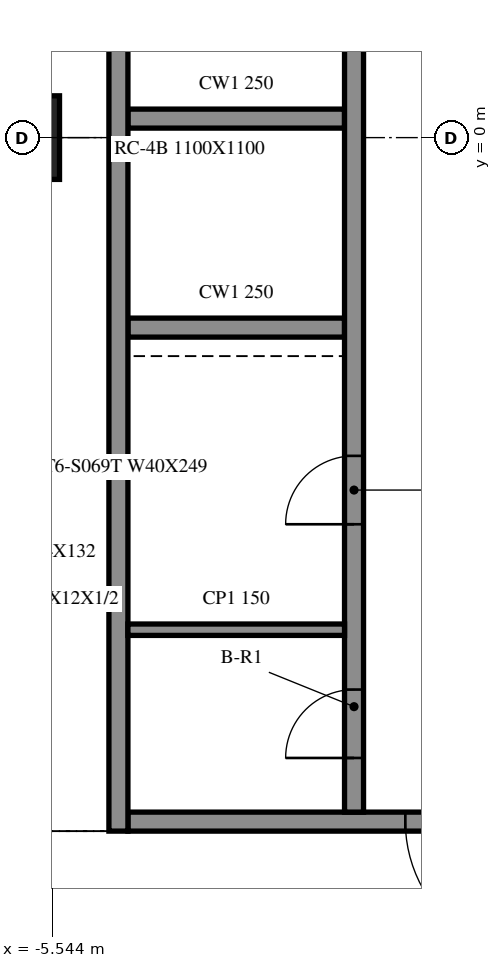
"""IFC4 building model, lengths in metres.
Left out: names, types, materials, properties, quantities, classifications, styles, units other than length and angle.
Written with IfcOpenShell. Run it as: python <this file> out.ifc"""

import sys

from ifc_helpers import new_model, si_unit, direction, frame, frame_2d, origin, origin_2d, place, context, subcontext, project, spatial, rectangle, extrude, element, fill, save


model = new_model("IFC4")
c1 = context("Model", 3, precision=1e-05, world=origin(), true_north=direction((0.0, 1.0)))
c2 = subcontext(c1, "Body", "Model", "MODEL_VIEW")
j1 = project(units=[si_unit("LENGTHUNIT", "METRE"), si_unit("PLANEANGLEUNIT", "RADIAN")], contexts=[c1])
p1 = place(None, origin())
s1 = spatial("IfcSite", under=j1, at=p1, CompositionType="ELEMENT")
p2 = place(p1, origin())
s2 = spatial("IfcBuilding", under=s1, at=p2, CompositionType="ELEMENT")
p3 = place(p2, frame((0.0, 0.0, 224.3)))
s3 = spatial("IfcBuildingStorey", under=s2, at=p3, CompositionType="ELEMENT", Elevation=224.3)
p4 = place(p3, frame((-6.0, 0.0, -0.4), z_axis=(0.0, 0.0, 1.0), x_axis=(1.0, 0.0, 0.0)))
e1 = element("IfcColumn", 1, at=p4, inside=s3, PredefinedType="COLUMN", context=c2, shape_type="SweptSolid", body=[
    extrude(rectangle(XDim=1.1, YDim=1.1, at=origin_2d()), origin(), (0.0, 0.0, 1.0), 4.36),
])
p5 = place(p3, frame((-4.675, 15.125, 0.0), z_axis=(0.0, 0.0, 1.0), x_axis=(0.0, -1.0, 0.0)))
e2 = element("IfcWall", 2, at=p5, inside=s3, PredefinedType="SOLIDWALL", context=c2, shape_type="SweptSolid", body=[
    extrude(rectangle(XDim=24.25, YDim=0.25, at=frame_2d((12.125, 0.0))), origin(), (0.0, 0.0, 1.0), 3.96),
])
p6 = place(p3, frame((4.55, -9.0, 0.0), z_axis=(0.0, 0.0, 1.0), x_axis=(-1.0, 0.0, 0.0)))
e3 = element("IfcWall", 3, at=p6, inside=s3, PredefinedType="SOLIDWALL", context=c2, shape_type="SweptSolid", body=[
    extrude(rectangle(XDim=9.1, YDim=0.25, at=frame_2d((4.55, 0.0))), origin(), (0.0, 0.0, 1.0), 3.96),
])
p7 = place(p6, frame((3.65, 0.0, 0.0)))
e4 = element("IfcOpeningElement", 4, at=p7, cuts=e3, PredefinedType="OPENING", context=c2, shape_type="SweptSolid", body=[
    extrude(rectangle(XDim=1.8, YDim=2.1, at=frame_2d((0.9, 1.05))), frame((0.0, 0.135, 0.0), z_axis=(0.0, -1.0, 0.0), x_axis=(1.0, 0.0, 0.0)), (0.0, 0.0, 1.0), 0.27),
])
p8 = place(p3, frame((-1.575, -8.875, 0.0), z_axis=(0.0, 0.0, 1.0), x_axis=(0.0, 1.0, 0.0)))
e5 = element("IfcWall", 5, at=p8, inside=s3, PredefinedType="SOLIDWALL", context=c2, shape_type="SweptSolid", body=[
    extrude(rectangle(XDim=23.75, YDim=0.25, at=frame_2d((11.875, 0.0))), origin(), (0.0, 0.0, 1.0), 3.96),
])
p9 = place(p8, frame((0.712, 0.0, 0.0)))
e6 = element("IfcOpeningElement", 6, at=p9, cuts=e5, PredefinedType="OPENING", context=c2, shape_type="SweptSolid", body=[
    extrude(rectangle(XDim=0.9, YDim=2.1, at=frame_2d((0.45, 1.05))), frame((0.0, 0.135, 0.0), z_axis=(0.0, -1.0, 0.0), x_axis=(1.0, 0.0, 0.0)), (0.0, 0.0, 1.0), 0.27),
])
p10 = place(p8, frame((3.788, 0.0, 0.0)))
e7 = element("IfcOpeningElement", 7, at=p10, cuts=e5, PredefinedType="OPENING", context=c2, shape_type="SweptSolid", body=[
    extrude(rectangle(XDim=0.9, YDim=2.1, at=frame_2d((0.45, 1.05))), frame((0.0, 0.135, 0.0), z_axis=(0.0, -1.0, 0.0), x_axis=(1.0, 0.0, 0.0)), (0.0, 0.0, 1.0), 0.27),
])
p11 = place(p8, frame((20.3, 0.0, 0.0)))
e8 = element("IfcOpeningElement", 8, at=p11, cuts=e5, PredefinedType="OPENING", context=c2, shape_type="SweptSolid", body=[
    extrude(rectangle(XDim=0.9, YDim=2.1, at=frame_2d((0.45, 1.05))), frame((0.0, 0.135, 0.0), z_axis=(0.0, -1.0, 0.0), x_axis=(1.0, 0.0, 0.0)), (0.0, 0.0, 1.0), 0.27),
])
for number, where, z_axis, x_axis in (
    (9, (-4.55, -2.5, 0.0), (0.0, 0.0, 1.0), (1.0, 0.0, 0.0)),
    (10, (-4.55, 0.25, 0.0), (0.0, 0.0, 1.0), (1.0, 0.0, 0.0)),
):
    element("IfcWall", number, at=place(p3, frame(where, z_axis=z_axis, x_axis=x_axis)), inside=s3, PredefinedType="SOLIDWALL", context=c2, shape_type="SweptSolid", body=[
        extrude(rectangle(XDim=2.85, YDim=0.25, at=frame_2d((1.425, 0.0))), origin(), (0.0, 0.0, 1.0), 3.96),
    ])
p12 = place(p3, frame((-4.55, -6.475, 0.0), z_axis=(0.0, 0.0, 1.0), x_axis=(1.0, 0.0, 0.0)))
e11 = element("IfcWall", 11, at=p12, inside=s3, PredefinedType="PARTITIONING", context=c2, shape_type="SweptSolid", body=[
    extrude(rectangle(XDim=2.85, YDim=0.15, at=frame_2d((1.425, 0.0))), origin(), (0.0, 0.0, 1.0), 3.96),
])
p13 = place(p7, origin())
e12 = element("IfcDoor", 12, at=p13, inside=s3, OperationType="DOUBLE_DOOR_SINGLE_SWING", PredefinedType="DOOR", context=c2, shape_type="SweptSolid", body=[
    extrude(rectangle(XDim=1.8, YDim=2.1, at=frame_2d((0.9, 1.05))), frame((0.0, 0.025, 0.0), z_axis=(0.0, -1.0, 0.0), x_axis=(1.0, 0.0, 0.0)), (0.0, 0.0, 1.0), 0.05),
])
fill(e4, e12)
p14 = place(p9, origin())
e13 = element("IfcDoor", 13, at=p14, inside=s3, OperationType="SINGLE_SWING_LEFT", PredefinedType="DOOR", context=c2, shape_type="SweptSolid", body=[
    extrude(rectangle(XDim=0.9, YDim=2.1, at=frame_2d((0.45, 1.05))), frame((0.0, 0.025, 0.0), z_axis=(0.0, -1.0, 0.0), x_axis=(1.0, 0.0, 0.0)), (0.0, 0.0, 1.0), 0.05),
])
fill(e6, e13)
p15 = place(p10, origin())
e14 = element("IfcDoor", 14, at=p15, inside=s3, OperationType="SINGLE_SWING_RIGHT", PredefinedType="DOOR", context=c2, shape_type="SweptSolid", body=[
    extrude(rectangle(XDim=0.9, YDim=2.1, at=frame_2d((0.45, 1.05))), frame((0.0, 0.025, 0.0), z_axis=(0.0, -1.0, 0.0), x_axis=(1.0, 0.0, 0.0)), (0.0, 0.0, 1.0), 0.05),
])
fill(e7, e14)
save(model, sys.argv[1])
